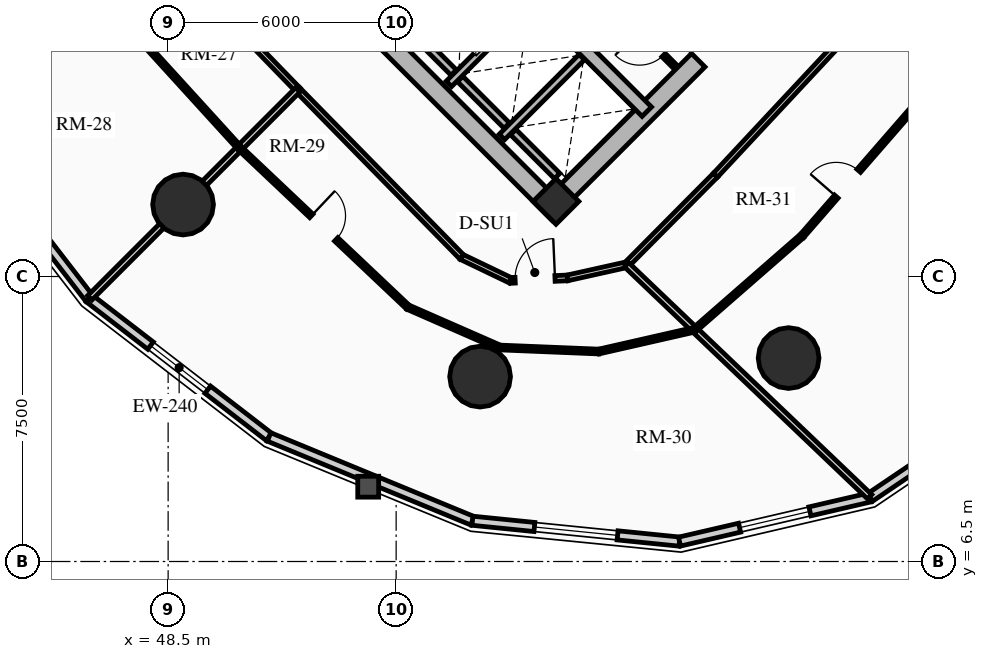
"""IFC4 building model, lengths in metres.
Left out: names, types, materials, properties, quantities, classifications, styles, units other than length and angle.
Written with IfcOpenShell. Run it as: python <this file> out.ifc"""

import sys

from ifc_helpers import new_model, si_unit, direction, frame, frame_2d, origin, origin_2d, place, context, subcontext, project, spatial, rectangle, circle, extrude, source, transform, mapped, element, fill, save


model = new_model("IFC4")
c1 = context("Model", 3, precision=1e-05, world=origin(), true_north=direction((0.0, 1.0)))
c2 = subcontext(c1, "Body", "Model", "MODEL_VIEW")
j1 = project(units=[si_unit("LENGTHUNIT", "METRE"), si_unit("PLANEANGLEUNIT", "RADIAN")], contexts=[c1])
p1 = place(None, origin())
s1 = spatial("IfcSite", under=j1, at=p1, CompositionType="ELEMENT")
p2 = place(p1, origin())
s2 = spatial("IfcBuilding", under=s1, at=p2, CompositionType="ELEMENT")
p3 = place(p2, frame((0.0, 0.0, 59.83)))
s3 = spatial("IfcBuildingStorey", under=s2, at=p3, CompositionType="ELEMENT", Elevation=59.83)
p4 = place(p3, frame((58.773, 15.661, 0.0), z_axis=(0.0, 0.0, 1.0), x_axis=(-0.707106781187, 0.707106781187, 0.0)))
e1 = element("IfcWall", 1, at=p4, inside=s3, PredefinedType="SHEAR", context=c2, shape_type="SweptSolid", body=[
    extrude(rectangle(XDim=14.3, YDim=0.5, at=frame_2d((7.15, 0.0))), origin(), (0.0, 0.0, 1.0), 2.91),
])
p5 = place(p3, frame((58.596, 15.838, 0.0), z_axis=(0.0, 0.0, 1.0), x_axis=(0.707106781187, 0.707106781187, 0.0)))
e2 = element("IfcWall", 2, at=p5, inside=s3, PredefinedType="SHEAR", context=c2, shape_type="SweptSolid", body=[
    extrude(rectangle(XDim=10.7, YDim=0.5, at=frame_2d((5.35, 0.0))), origin(), (0.0, 0.0, 1.0), 2.91),
])
m1 = source(origin(), c2, "Body", "SweptSolid", [
    extrude(rectangle(XDim=1.5, YDim=2.02, at=frame_2d((0.75, 1.01))), frame((0.0, 0.26, 0.0), z_axis=(0.0, -1.0, 0.0), x_axis=(1.0, 0.0, 0.0)), (0.0, 0.0, 1.0), 0.52),
])
p6 = place(p5, frame((5.45, 0.0, 0.0)))
e3 = element("IfcOpeningElement", 3, at=p6, cuts=e2, PredefinedType="OPENING", context=c2, shape_type="MappedRepresentation", body=[
    mapped(m1, transform((0.0, 0.0, 0.0), x_axis=(1.0, 0.0, 0.0), y_axis=(0.0, 1.0, 0.0), z_axis=(0.0, 0.0, 1.0), scale=1.0)),
])
p7 = place(p3, frame((61.096, 18.338, 0.0), z_axis=(0.0, 0.0, 1.0), x_axis=(-0.707106781187, 0.707106781187, 0.0)))
e4 = element("IfcWall", 4, at=p7, inside=s3, PredefinedType="SHEAR", context=c2, shape_type="SweptSolid", body=[
    extrude(rectangle(XDim=13.8, YDim=0.35, at=frame_2d((6.9, 0.0))), origin(), (0.0, 0.0, 1.0), 2.91),
])
m2 = source(origin(), c2, "Body", "SweptSolid", [
    extrude(rectangle(XDim=1.1, YDim=2.015, at=frame_2d((0.55, 1.007))), frame((0.0, 0.185, 0.0), z_axis=(0.0, -1.0, 0.0), x_axis=(1.0, 0.0, 0.0)), (0.0, 0.0, 1.0), 0.37),
])
p8 = place(p7, frame((4.9, 0.0, 0.0)))
e5 = element("IfcOpeningElement", 5, at=p8, cuts=e4, PredefinedType="OPENING", context=c2, shape_type="MappedRepresentation", body=[
    mapped(m2, transform((0.0, 0.0, 0.0), x_axis=(1.0, 0.0, 0.0), y_axis=(0.0, 1.0, 0.0), z_axis=(0.0, 0.0, 1.0), scale=1.0)),
])
m3 = source(origin(), c2, "Body", "SweptSolid", [
    extrude(rectangle(XDim=1.15, YDim=2.02, at=frame_2d((0.575, 1.01))), frame((0.0, 0.185, 0.0), z_axis=(0.0, -1.0, 0.0), x_axis=(1.0, 0.0, 0.0)), (0.0, 0.0, 1.0), 0.37),
])
p9 = place(p7, frame((7.32, 0.0, 0.0)))
e6 = element("IfcOpeningElement", 6, at=p9, cuts=e4, PredefinedType="OPENING", context=c2, shape_type="MappedRepresentation", body=[
    mapped(m3, transform((0.0, 0.0, 0.0), x_axis=(1.0, 0.0, 0.0), y_axis=(0.0, 1.0, 0.0), z_axis=(0.0, 0.0, 1.0), scale=1.0)),
])
p10 = place(p3, frame((58.706, 15.976, 0.0), z_axis=(0.0, 0.0, 1.0), x_axis=(0.707106781187, 0.707106781187, 0.0)))
e7 = element("IfcColumn", 7, at=p10, inside=s3, PredefinedType="COLUMN", context=c2, shape_type="SweptSolid", body=[
    extrude(rectangle(XDim=0.85, YDim=0.85, at=origin_2d()), origin(), (0.0, 0.0, 1.0), 2.91),
])
for number, where, z_axis, x_axis in (
    (8, (48.893, 15.893, 0.0), (0.0, 0.0, 1.0), (1.0, 0.0, 0.0)),
    (9, (56.709, 11.365, 0.0), (0.0, 0.0, 1.0), (1.0, 0.0, 0.0)),
    (10, (64.827, 11.854, 0.0), (0.0, 0.0, 1.0), (1.0, 0.0, 0.0)),
):
    element("IfcColumn", number, at=place(p3, frame(where, z_axis=z_axis, x_axis=x_axis)), inside=s3, PredefinedType="USERDEFINED", context=c2, shape_type="SweptSolid", body=[
        extrude(circle(Radius=0.8, at=origin_2d()), origin(), (0.0, 0.0, 1.0), 2.91),
    ])
p11 = place(p3, frame((46.425, 13.425, 0.0), z_axis=(0.0, 0.0, 1.0), x_axis=(-0.610502519057, 0.792014314407, 0.0)))
e11 = element("IfcWall", 11, at=p11, inside=s3, PredefinedType="SOLIDWALL", context=c2, shape_type="SweptSolid", body=[
    extrude(rectangle(XDim=5.973, YDim=0.24, at=frame_2d((2.987, 0.0))), origin(), (0.0, 0.0, 1.0), 2.073),
])
p12 = place(p3, frame((51.156, 9.778, 0.0), z_axis=(0.0, 0.0, 1.0), x_axis=(-0.792014314407, 0.610502519057, 0.0)))
e12 = element("IfcWall", 12, at=p12, inside=s3, PredefinedType="SOLIDWALL", context=c2, shape_type="SweptSolid", body=[
    extrude(rectangle(XDim=5.973, YDim=0.24, at=frame_2d((2.987, 0.0))), origin(), (0.0, 0.0, 1.0), 2.073),
])
m4 = source(origin(), c2, "Body", "SweptSolid", [
    extrude(rectangle(XDim=1.9, YDim=1.35, at=frame_2d((0.95, 0.675))), frame((0.0, 0.13, 0.0), z_axis=(0.0, -1.0, 0.0), x_axis=(1.0, 0.0, 0.0)), (0.0, 0.0, 1.0), 0.26),
])
p13 = place(p12, frame((2.037, 0.0, 0.65)))
e13 = element("IfcOpeningElement", 13, at=p13, cuts=e12, PredefinedType="OPENING", context=c2, shape_type="MappedRepresentation", body=[
    mapped(m4, transform((0.0, 0.0, 0.0), x_axis=(1.0, 0.0, 0.0), y_axis=(0.0, 1.0, 0.0), z_axis=(0.0, 0.0, 1.0), scale=1.0)),
])
p14 = place(p3, frame((56.507, 7.572, 0.0), z_axis=(0.0, 0.0, 1.0), x_axis=(-0.924563629567, 0.381027682565, 0.0)))
e14 = element("IfcWall", 14, at=p14, inside=s3, PredefinedType="SOLIDWALL", context=c2, shape_type="SweptSolid", body=[
    extrude(rectangle(XDim=5.789, YDim=0.24, at=frame_2d((2.894, 0.0))), origin(), (0.0, 0.0, 1.0), 2.073),
])
p15 = place(p3, frame((61.957, 7.024, 0.0), z_axis=(0.0, 0.0, 1.0), x_axis=(-0.994970765694, 0.100165739718, 0.0)))
e15 = element("IfcWall", 15, at=p15, inside=s3, PredefinedType="SOLIDWALL", context=c2, shape_type="SweptSolid", body=[
    extrude(rectangle(XDim=5.477, YDim=0.24, at=frame_2d((2.738, 0.0))), origin(), (0.0, 0.0, 1.0), 2.073),
])
m5 = source(origin(), c2, "Body", "SweptSolid", [
    extrude(rectangle(XDim=2.2, YDim=1.35, at=frame_2d((1.1, 0.675))), frame((0.0, 0.13, 0.0), z_axis=(0.0, -1.0, 0.0), x_axis=(1.0, 0.0, 0.0)), (0.0, 0.0, 1.0), 0.26),
])
p16 = place(p15, frame((1.638, 0.0, 0.65)))
e16 = element("IfcOpeningElement", 16, at=p16, cuts=e15, PredefinedType="OPENING", context=c2, shape_type="MappedRepresentation", body=[
    mapped(m5, transform((0.0, 0.0, 0.0), x_axis=(1.0, 0.0, 0.0), y_axis=(0.0, 1.0, 0.0), z_axis=(0.0, 0.0, 1.0), scale=1.0)),
])
p17 = place(p3, frame((66.969, 8.186, 0.0), z_axis=(0.0, 0.0, 1.0), x_axis=(-0.974166016949, -0.225833060959, 0.0)))
e17 = element("IfcWall", 17, at=p17, inside=s3, PredefinedType="SOLIDWALL", context=c2, shape_type="SweptSolid", body=[
    extrude(rectangle(XDim=5.146, YDim=0.24, at=frame_2d((2.573, 0.0))), origin(), (0.0, 0.0, 1.0), 2.073),
])
p18 = place(p17, frame((1.623, 0.0, 0.65)))
e18 = element("IfcOpeningElement", 18, at=p18, cuts=e17, PredefinedType="OPENING", context=c2, shape_type="MappedRepresentation", body=[
    mapped(m4, transform((0.0, 0.0, 0.0), x_axis=(1.0, 0.0, 0.0), y_axis=(0.0, 1.0, 0.0), z_axis=(0.0, 0.0, 1.0), scale=1.0)),
])
p19 = place(p3, frame((71.055, 10.945, 0.0), z_axis=(0.0, 0.0, 1.0), x_axis=(-0.828736708604, -0.559638693991, 0.0)))
e19 = element("IfcWall", 19, at=p19, inside=s3, PredefinedType="SOLIDWALL", context=c2, shape_type="SweptSolid", body=[
    extrude(rectangle(XDim=4.93, YDim=0.24, at=frame_2d((2.465, 0.0))), origin(), (0.0, 0.0, 1.0), 2.073),
])
p20 = place(p3, frame((55.888, 19.069, 0.0), z_axis=(0.0, 0.0, 1.0), x_axis=(0.707106781187, 0.707106781187, 0.0)))
e20 = element("IfcWall", 20, at=p20, inside=s3, PredefinedType="SHEAR", context=c2, shape_type="SweptSolid", body=[
    extrude(rectangle(XDim=2.97, YDim=0.2, at=frame_2d((1.485, 0.0))), origin(), (0.0, 0.0, 1.0), 2.91),
])
p21 = place(p3, frame((56.015, 19.366, 0.0), z_axis=(0.0, 0.0, 1.0), x_axis=(-0.707106781187, 0.707106781187, 0.0)))
e21 = element("IfcWall", 21, at=p21, inside=s3, PredefinedType="SHEAR", context=c2, shape_type="SweptSolid", body=[
    extrude(rectangle(XDim=2.44, YDim=0.2, at=frame_2d((1.22, 0.0))), origin(), (0.0, 0.0, 1.0), 2.91),
])
p22 = place(p3, frame((57.284, 17.673, 0.0), z_axis=(0.0, 0.0, 1.0), x_axis=(0.707147878904, 0.70706568108, 0.0)))
e22 = element("IfcWall", 22, at=p22, inside=s3, PredefinedType="SHEAR", context=c2, shape_type="SweptSolid", body=[
    extrude(rectangle(XDim=2.97, YDim=0.2, at=frame_2d((1.485, 0.0))), origin(), (0.0, 0.0, 1.0), 2.91),
])
p23 = place(p3, frame((57.412, 17.97, 0.0), z_axis=(0.0, 0.0, 1.0), x_axis=(-0.707106781187, 0.707106781187, 0.0)))
e23 = element("IfcWall", 23, at=p23, inside=s3, PredefinedType="SHEAR", context=c2, shape_type="SweptSolid", body=[
    extrude(rectangle(XDim=1.735, YDim=0.2, at=frame_2d((0.867, 0.0))), origin(), (0.0, 0.0, 1.0), 2.91),
])
p24 = place(p3, frame((58.737, 16.644, 0.0), z_axis=(0.0, 0.0, 1.0), x_axis=(-0.707032117043, 0.707181437447, 0.0)))
e24 = element("IfcWall", 24, at=p24, inside=s3, PredefinedType="SHEAR", context=c2, shape_type="SweptSolid", body=[
    extrude(rectangle(XDim=1.635, YDim=0.2, at=frame_2d((0.817, 0.0))), origin(), (0.0, 0.0, 1.0), 2.91),
])
p25 = place(p3, frame((61.835, 19.529, 0.0), z_axis=(0.0, 0.0, 1.0), x_axis=(-0.707174592913, 0.707038962956, 0.0)))
e25 = element("IfcWall", 25, at=p25, inside=s3, PredefinedType="PARTITIONING", context=c2, shape_type="SweptSolid", body=[
    extrude(rectangle(XDim=1.8, YDim=0.125, at=frame_2d((0.9, 0.0))), origin(), (0.0, 0.0, 1.0), 2.635),
])
m6 = source(origin(), c2, "Body", "SweptSolid", [
    extrude(rectangle(XDim=0.9, YDim=2.005, at=frame_2d((0.45, 1.002))), frame((0.0, 0.073, 0.0), z_axis=(0.0, -1.0, 0.0), x_axis=(1.0, 0.0, 0.0)), (0.0, 0.0, 1.0), 0.145),
])
p26 = place(p25, frame((0.42, 0.0, 0.0)))
e26 = element("IfcOpeningElement", 26, at=p26, cuts=e25, PredefinedType="OPENING", context=c2, shape_type="MappedRepresentation", body=[
    mapped(m6, transform((0.0, 0.0, 0.0), x_axis=(1.0, 0.0, 0.0), y_axis=(0.0, 1.0, 0.0), z_axis=(0.0, 0.0, 1.0), scale=1.0)),
])
p27 = place(p3, frame((47.706, 23.253, 0.0), z_axis=(0.0, 0.0, 1.0), x_axis=(0.696179266346, -0.717867974707, 0.0)))
e27 = element("IfcWall", 27, at=p27, inside=s3, PredefinedType="PARTITIONING", context=c2, shape_type="SweptSolid", body=[
    extrude(rectangle(XDim=6.045, YDim=0.15, at=frame_2d((3.022, 0.0))), origin(), (0.0, 0.0, 1.0), 2.635),
])
p28 = place(p3, frame((51.914, 18.914, 0.0), z_axis=(0.0, 0.0, 1.0), x_axis=(0.699999313799, -0.714143515465, 0.0)))
e28 = element("IfcWall", 28, at=p28, inside=s3, PredefinedType="PARTITIONING", context=c2, shape_type="SweptSolid", body=[
    extrude(rectangle(XDim=6.162, YDim=0.15, at=frame_2d((3.081, 0.0))), origin(), (0.0, 0.0, 1.0), 2.159),
])
p29 = place(p3, frame((56.227, 14.513, 0.0), z_axis=(0.0, 0.0, 1.0), x_axis=(0.901477579283, -0.432825801044, 0.0)))
e29 = element("IfcWall", 29, at=p29, inside=s3, PredefinedType="PARTITIONING", context=c2, shape_type="SweptSolid", body=[
    extrude(rectangle(XDim=1.424, YDim=0.15, at=frame_2d((0.712, 0.0))), origin(), (0.0, 0.0, 1.0), 2.205),
])
p30 = place(p3, frame((57.511, 13.897, 0.0), z_axis=(0.0, 0.0, 1.0), x_axis=(0.999024538494, 0.044158481476, 0.0)))
e30 = element("IfcWall", 30, at=p30, inside=s3, PredefinedType="PARTITIONING", context=c2, shape_type="SweptSolid", body=[
    extrude(rectangle(XDim=1.498, YDim=0.15, at=frame_2d((0.749, 0.0))), origin(), (0.0, 0.0, 1.0), 2.159),
])
m7 = source(origin(), c2, "Body", "SweptSolid", [
    extrude(rectangle(XDim=1.05, YDim=2.015, at=frame_2d((0.525, 1.007))), frame((0.0, 0.085, 0.0), z_axis=(0.0, -1.0, 0.0), x_axis=(1.0, 0.0, 0.0)), (0.0, 0.0, 1.0), 0.17),
])
p31 = place(p30, frame((0.12, 0.0, 0.0)))
e31 = element("IfcOpeningElement", 31, at=p31, cuts=e30, PredefinedType="OPENING", context=c2, shape_type="MappedRepresentation", body=[
    mapped(m7, transform((0.0, 0.0, 0.0), x_axis=(1.0, 0.0, 0.0), y_axis=(0.0, 1.0, 0.0), z_axis=(0.0, 0.0, 1.0), scale=1.0)),
])
p32 = place(p3, frame((59.008, 13.963, 0.0), z_axis=(0.0, 0.0, 1.0), x_axis=(0.976020856791, 0.21767702476, 0.0)))
e32 = element("IfcWall", 32, at=p32, inside=s3, PredefinedType="PARTITIONING", context=c2, shape_type="SweptSolid", body=[
    extrude(rectangle(XDim=1.593, YDim=0.15, at=frame_2d((0.796, 0.0))), origin(), (0.0, 0.0, 1.0), 2.205),
])
p33 = place(p3, frame((60.562, 14.31, 0.0), z_axis=(0.0, 0.0, 1.0), x_axis=(0.704566236161, 0.709638230975, 0.0)))
e33 = element("IfcWall", 33, at=p33, inside=s3, PredefinedType="PARTITIONING", context=c2, shape_type="SweptSolid", body=[
    extrude(rectangle(XDim=3.321, YDim=0.15, at=frame_2d((1.661, 0.0))), origin(), (0.0, 0.0, 1.0), 2.159),
])
p34 = place(p3, frame((62.903, 16.667, 0.0), z_axis=(0.0, 0.0, 1.0), x_axis=(0.682371947497, 0.731005147225, 0.0)))
e34 = element("IfcWall", 34, at=p34, inside=s3, PredefinedType="PARTITIONING", context=c2, shape_type="SweptSolid", body=[
    extrude(rectangle(XDim=6.642, YDim=0.15, at=frame_2d((3.321, 0.0))), origin(), (0.0, 0.0, 1.0), 2.159),
])
p35 = place(p3, frame((51.914, 18.914, 0.0), z_axis=(0.0, 0.0, 1.0), x_axis=(-0.707106781187, -0.707106781187, 0.0)))
e35 = element("IfcWall", 35, at=p35, inside=s3, PredefinedType="PARTITIONING", context=c2, shape_type="SweptSolid", body=[
    extrude(rectangle(XDim=7.743, YDim=0.16, at=frame_2d((3.872, 0.0))), origin(), (0.0, 0.0, 1.0), 2.073),
])
p36 = place(p3, frame((60.562, 14.31, 0.0), z_axis=(0.0, 0.0, 1.0), x_axis=(0.723408813637, -0.690419936236, 0.0)))
e36 = element("IfcWall", 36, at=p36, inside=s3, PredefinedType="PARTITIONING", context=c2, shape_type="SweptSolid", body=[
    extrude(rectangle(XDim=8.844, YDim=0.16, at=frame_2d((4.422, 0.0))), origin(), (0.0, 0.0, 1.0), 2.073),
])
p37 = place(p3, frame((46.331, 21.828, 0.0), z_axis=(0.0, 0.0, 1.0), x_axis=(0.673296785471, -0.739372327501, 0.0)))
e37 = element("IfcWall", 37, at=p37, inside=s3, PredefinedType="PARTITIONING", context=c2, shape_type="SweptSolid", body=[
    extrude(rectangle(XDim=6.015, YDim=0.125, at=frame_2d((3.008, 0.0))), origin(), (0.0, 0.0, 1.0), 2.635),
])
p38 = place(p3, frame((50.381, 17.381, 0.0), z_axis=(0.0, 0.0, 1.0), x_axis=(0.726536500488, -0.687127872712, 0.0)))
e38 = element("IfcWall", 38, at=p38, inside=s3, PredefinedType="PARTITIONING", context=c2, shape_type="SweptSolid", body=[
    extrude(rectangle(XDim=6.096, YDim=0.125, at=frame_2d((3.048, 0.0))), origin(), (0.0, 0.0, 1.0), 2.159),
])
p39 = place(p38, frame((2.598, 0.0, 0.0)))
e39 = element("IfcOpeningElement", 39, at=p39, cuts=e38, PredefinedType="OPENING", context=c2, shape_type="MappedRepresentation", body=[
    mapped(m6, transform((0.0, 0.0, 0.0), x_axis=(1.0, 0.0, 0.0), y_axis=(0.0, 1.0, 0.0), z_axis=(0.0, 0.0, 1.0), scale=1.0)),
])
p40 = place(p3, frame((54.81, 13.192, 0.0), z_axis=(0.0, 0.0, 1.0), x_axis=(0.91595798127, -0.40127419123, 0.0)))
e40 = element("IfcWall", 40, at=p40, inside=s3, PredefinedType="PARTITIONING", context=c2, shape_type="SweptSolid", body=[
    extrude(rectangle(XDim=2.644, YDim=0.125, at=frame_2d((1.322, 0.0))), origin(), (0.0, 0.0, 1.0), 2.159),
])
p41 = place(p3, frame((57.231, 12.131, 0.0), z_axis=(0.0, 0.0, 1.0), x_axis=(0.999171636131, -0.040694490436, 0.0)))
e41 = element("IfcWall", 41, at=p41, inside=s3, PredefinedType="PARTITIONING", context=c2, shape_type="SweptSolid", body=[
    extrude(rectangle(XDim=2.604, YDim=0.125, at=frame_2d((1.302, 0.0))), origin(), (0.0, 0.0, 1.0), 2.635),
])
p42 = place(p3, frame((59.833, 12.025, 0.0), z_axis=(0.0, 0.0, 1.0), x_axis=(0.975011214108, 0.222155648959, 0.0)))
e42 = element("IfcWall", 42, at=p42, inside=s3, PredefinedType="PARTITIONING", context=c2, shape_type="SweptSolid", body=[
    extrude(rectangle(XDim=2.586, YDim=0.125, at=frame_2d((1.293, 0.0))), origin(), (0.0, 0.0, 1.0), 2.205),
])
p43 = place(p3, frame((62.354, 12.6, 0.0), z_axis=(0.0, 0.0, 1.0), x_axis=(0.75329750535, 0.657679913357, 0.0)))
e43 = element("IfcWall", 43, at=p43, inside=s3, PredefinedType="PARTITIONING", context=c2, shape_type="SweptSolid", body=[
    extrude(rectangle(XDim=3.753, YDim=0.125, at=frame_2d((1.877, 0.0))), origin(), (0.0, 0.0, 1.0), 2.159),
])
p44 = place(p3, frame((65.181, 15.068, 0.0), z_axis=(0.0, 0.0, 1.0), x_axis=(0.656272116637, 0.754524293131, 0.0)))
e44 = element("IfcWall", 44, at=p44, inside=s3, PredefinedType="PARTITIONING", context=c2, shape_type="SweptSolid", body=[
    extrude(rectangle(XDim=6.147, YDim=0.125, at=frame_2d((3.074, 0.0))), origin(), (0.0, 0.0, 1.0), 2.159),
])
p45 = place(p44, frame((1.372, 0.0, 0.0)))
e45 = element("IfcOpeningElement", 45, at=p45, cuts=e44, PredefinedType="OPENING", context=c2, shape_type="MappedRepresentation", body=[
    mapped(m6, transform((0.0, 0.0, 0.0), x_axis=(1.0, 0.0, 0.0), y_axis=(0.0, 1.0, 0.0), z_axis=(0.0, 0.0, 1.0), scale=1.0)),
])
m8 = source(origin(), c2, "Body", "SweptSolid", [
    extrude(rectangle(XDim=1.9, YDim=1.35, at=frame_2d((0.95, 0.675))), frame((0.0, 0.03, 0.0), z_axis=(0.0, -1.0, 0.0), x_axis=(1.0, 0.0, 0.0)), (0.0, 0.0, 1.0), 0.06),
])
p46 = place(p13, origin())
e46 = element("IfcWindow", 46, at=p46, inside=s3, PartitioningType="DOUBLE_PANEL_VERTICAL", PredefinedType="WINDOW", context=c2, shape_type="MappedRepresentation", body=[
    mapped(m8, transform((0.0, 0.0, 0.0), x_axis=(1.0, 0.0, 0.0), y_axis=(0.0, 1.0, 0.0), z_axis=(0.0, 0.0, 1.0), scale=1.0)),
])
fill(e13, e46)
m9 = source(origin(), c2, "Body", "SweptSolid", [
    extrude(rectangle(XDim=2.2, YDim=1.35, at=frame_2d((1.1, 0.675))), frame((0.0, 0.03, 0.0), z_axis=(0.0, -1.0, 0.0), x_axis=(1.0, 0.0, 0.0)), (0.0, 0.0, 1.0), 0.06),
])
p47 = place(p16, origin())
e47 = element("IfcWindow", 47, at=p47, inside=s3, PartitioningType="DOUBLE_PANEL_VERTICAL", PredefinedType="WINDOW", context=c2, shape_type="MappedRepresentation", body=[
    mapped(m9, transform((0.0, 0.0, 0.0), x_axis=(1.0, 0.0, 0.0), y_axis=(0.0, 1.0, 0.0), z_axis=(0.0, 0.0, 1.0), scale=1.0)),
])
fill(e16, e47)
p48 = place(p18, origin())
e48 = element("IfcWindow", 48, at=p48, inside=s3, PartitioningType="DOUBLE_PANEL_VERTICAL", PredefinedType="WINDOW", context=c2, shape_type="MappedRepresentation", body=[
    mapped(m8, transform((0.0, 0.0, 0.0), x_axis=(1.0, 0.0, 0.0), y_axis=(0.0, 1.0, 0.0), z_axis=(0.0, 0.0, 1.0), scale=1.0)),
])
fill(e18, e48)
m10 = source(origin(), c2, "Body", "SweptSolid", [
    extrude(rectangle(XDim=1.5, YDim=2.02, at=frame_2d((0.75, 1.01))), frame((0.0, 0.025, 0.0), z_axis=(0.0, -1.0, 0.0), x_axis=(1.0, 0.0, 0.0)), (0.0, 0.0, 1.0), 0.05),
])
p49 = place(p6, origin())
e49 = element("IfcDoor", 49, at=p49, inside=s3, OperationType="DOUBLE_DOOR_SINGLE_SWING", PredefinedType="DOOR", context=c2, shape_type="MappedRepresentation", body=[
    mapped(m10, transform((0.0, 0.0, 0.0), x_axis=(1.0, 0.0, 0.0), y_axis=(0.0, 1.0, 0.0), z_axis=(0.0, 0.0, 1.0), scale=1.0)),
])
fill(e3, e49)
m11 = source(origin(), c2, "Body", "SweptSolid", [
    extrude(rectangle(XDim=0.9, YDim=2.005, at=frame_2d((0.45, 1.002))), frame((0.0, 0.025, 0.0), z_axis=(0.0, -1.0, 0.0), x_axis=(1.0, 0.0, 0.0)), (0.0, 0.0, 1.0), 0.05),
])
p50 = place(p26, origin())
e50 = element("IfcDoor", 50, at=p50, inside=s3, OperationType="SINGLE_SWING_RIGHT", PredefinedType="DOOR", context=c2, shape_type="MappedRepresentation", body=[
    mapped(m11, transform((0.0, 0.0, 0.0), x_axis=(1.0, 0.0, 0.0), y_axis=(0.0, 1.0, 0.0), z_axis=(0.0, 0.0, 1.0), scale=1.0)),
])
fill(e26, e50)
m12 = source(origin(), c2, "Body", "SweptSolid", [
    extrude(rectangle(XDim=1.05, YDim=2.015, at=frame_2d((0.525, 1.007))), frame((0.0, 0.025, 0.0), z_axis=(0.0, -1.0, 0.0), x_axis=(1.0, 0.0, 0.0)), (0.0, 0.0, 1.0), 0.05),
])
p51 = place(p31, origin())
e51 = element("IfcDoor", 51, at=p51, inside=s3, OperationType="SINGLE_SWING_RIGHT", PredefinedType="DOOR", context=c2, shape_type="MappedRepresentation", body=[
    mapped(m12, transform((0.0, 0.0, 0.0), x_axis=(1.0, 0.0, 0.0), y_axis=(0.0, 1.0, 0.0), z_axis=(0.0, 0.0, 1.0), scale=1.0)),
])
fill(e31, e51)
p52 = place(p39, origin())
e52 = element("IfcDoor", 52, at=p52, inside=s3, OperationType="SINGLE_SWING_LEFT", PredefinedType="DOOR", context=c2, shape_type="MappedRepresentation", body=[
    mapped(m11, transform((0.0, 0.0, 0.0), x_axis=(1.0, 0.0, 0.0), y_axis=(0.0, 1.0, 0.0), z_axis=(0.0, 0.0, 1.0), scale=1.0)),
])
fill(e39, e52)
p53 = place(p45, origin())
e53 = element("IfcDoor", 53, at=p53, inside=s3, OperationType="SINGLE_SWING_LEFT", PredefinedType="DOOR", context=c2, shape_type="MappedRepresentation", body=[
    mapped(m11, transform((0.0, 0.0, 0.0), x_axis=(1.0, 0.0, 0.0), y_axis=(0.0, 1.0, 0.0), z_axis=(0.0, 0.0, 1.0), scale=1.0)),
])
fill(e45, e53)
save(model, sys.argv[1])
